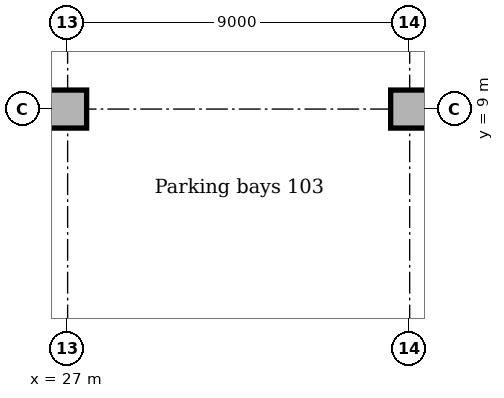
"""IFC4 building model, lengths in metres.
Left out: names, types, materials, properties, quantities, classifications, styles, units other than length and angle.
Written with IfcOpenShell. Run it as: python <this file> out.ifc"""

import sys

from ifc_helpers import new_model, si_unit, direction, frame, origin, origin_2d, place, context, subcontext, project, spatial, rectangle, extrude, element, save


model = new_model("IFC4")
c1 = context("Model", 3, precision=1e-05, world=origin(), true_north=direction((0.0, 1.0)))
c2 = subcontext(c1, "Body", "Model", "MODEL_VIEW")
j1 = project(units=[si_unit("LENGTHUNIT", "METRE"), si_unit("PLANEANGLEUNIT", "RADIAN")], contexts=[c1])
p1 = place(None, origin())
s1 = spatial("IfcSite", under=j1, at=p1, CompositionType="ELEMENT")
p2 = place(p1, origin())
s2 = spatial("IfcBuilding", under=s1, at=p2, CompositionType="ELEMENT")
p3 = place(p2, frame((0.0, 0.0, -5.0)))
s3 = spatial("IfcBuildingStorey", under=s2, at=p3, CompositionType="ELEMENT", Elevation=-5.0)
for number, where, z_axis, x_axis in (
    (1, (27.0, 9.0, 0.0), (0.0, 0.0, 1.0), (1.0, 0.0, 0.0)),
    (2, (36.0, 9.0, 0.0), (0.0, 0.0, 1.0), (1.0, 0.0, 0.0)),
):
    element("IfcColumn", number, at=place(p3, frame(where, z_axis=z_axis, x_axis=x_axis)), inside=s3, PredefinedType="COLUMN", context=c2, shape_type="SweptSolid", body=[
        extrude(rectangle(XDim=1.0, YDim=1.0, at=origin_2d()), origin(), (0.0, 0.0, 1.0), 4.7),
    ])
save(model, sys.argv[1])
